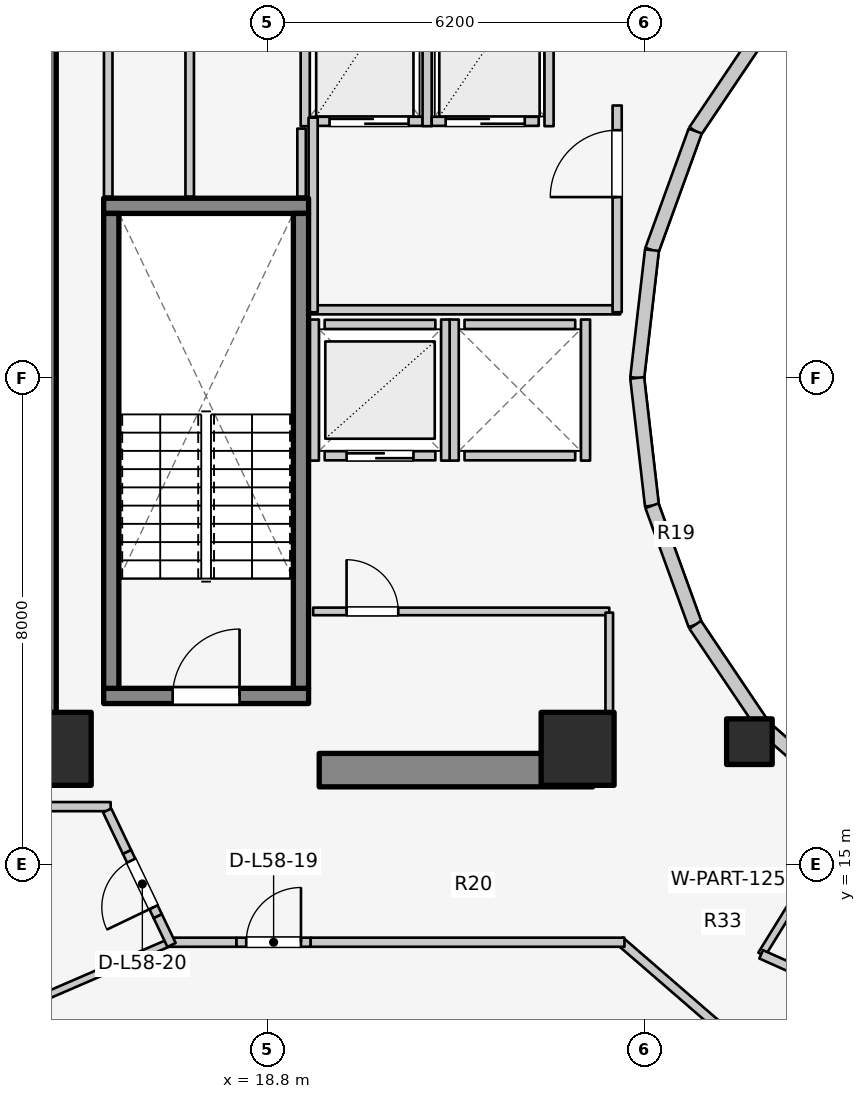
"""IFC4 building model, lengths in metres.
Left out: names, types, materials, properties, quantities, classifications, styles, units other than length and angle.
Written with IfcOpenShell. Run it as: python <this file> out.ifc"""

import sys

from ifc_helpers import new_model, si_unit, direction, frame, frame_2d, origin, origin_2d, place, context, subcontext, project, spatial, rectangle, extrude, element, fill, save


model = new_model("IFC4")
c1 = context("Model", 3, precision=1e-05, world=origin(), true_north=direction((0.0, 1.0)))
c2 = subcontext(c1, "Body", "Model", "MODEL_VIEW")
j1 = project(units=[si_unit("LENGTHUNIT", "METRE"), si_unit("PLANEANGLEUNIT", "RADIAN")], contexts=[c1])
p1 = place(None, origin())
s1 = spatial("IfcSite", under=j1, at=p1, CompositionType="ELEMENT")
p2 = place(p1, origin())
s2 = spatial("IfcBuilding", under=s1, at=p2, CompositionType="ELEMENT")
p3 = place(p2, frame((0.0, 0.0, 190.1)))
s3 = spatial("IfcBuildingStorey", under=s2, at=p3, CompositionType="ELEMENT", Elevation=190.1)
p4 = place(p3, frame((15.05, 17.05, 0.0), z_axis=(0.0, 0.0, 1.0), x_axis=(0.0, 1.0, 0.0)))
e1 = element("IfcWall", 1, at=p4, inside=s3, PredefinedType="SHEAR", context=c2, shape_type="SweptSolid", body=[
    extrude(rectangle(XDim=12.8, YDim=0.55, at=frame_2d((6.4, 0.0))), origin(), (0.0, 0.0, 1.0), 3.1),
])
p5 = place(p3, frame((19.65, 16.55, 0.0), z_axis=(0.0, 0.0, 1.0), x_axis=(1.0, 0.0, 0.0)))
e2 = element("IfcWall", 2, at=p5, inside=s3, PredefinedType="SHEAR", context=c2, shape_type="SweptSolid", body=[
    extrude(rectangle(XDim=4.5, YDim=0.55, at=frame_2d((2.25, 0.0))), origin(), (0.0, 0.0, 1.0), 3.1),
])
p6 = place(p3, frame((16.105, 17.77, 0.0), z_axis=(0.0, 0.0, 1.0), x_axis=(1.0, 0.0, 0.0)))
e3 = element("IfcWall", 3, at=p6, inside=s3, PredefinedType="SOLIDWALL", context=c2, shape_type="SweptSolid", body=[
    extrude(rectangle(XDim=3.37, YDim=0.25, at=frame_2d((1.685, 0.0))), origin(), (0.0, 0.0, 1.0), 3.1),
])
p7 = place(p6, frame((1.135, 0.0, 0.0)))
e4 = element("IfcOpeningElement", 4, at=p7, cuts=e3, PredefinedType="OPENING", context=c2, shape_type="SweptSolid", body=[
    extrude(rectangle(XDim=1.1, YDim=2.1, at=frame_2d((0.55, 1.05))), frame((0.0, 0.135, 0.0), z_axis=(0.0, -1.0, 0.0), x_axis=(1.0, 0.0, 0.0)), (0.0, 0.0, 1.0), 0.27),
])
p8 = place(p3, frame((16.105, 25.83, 0.0), z_axis=(0.0, 0.0, 1.0), x_axis=(1.0, 0.0, 0.0)))
e5 = element("IfcWall", 5, at=p8, inside=s3, PredefinedType="SOLIDWALL", context=c2, shape_type="SweptSolid", body=[
    extrude(rectangle(XDim=3.37, YDim=0.25, at=frame_2d((1.685, 0.0))), origin(), (0.0, 0.0, 1.0), 3.1),
])
for number, where, z_axis, x_axis in (
    (6, (16.23, 17.895, 0.0), (0.0, 0.0, 1.0), (0.0, 1.0, 0.0)),
    (7, (19.35, 17.895, 0.0), (0.0, 0.0, 1.0), (0.0, 1.0, 0.0)),
):
    element("IfcWall", number, at=place(p3, frame(where, z_axis=z_axis, x_axis=x_axis)), inside=s3, PredefinedType="SOLIDWALL", context=c2, shape_type="SweptSolid", body=[
        extrude(rectangle(XDim=7.81, YDim=0.25, at=frame_2d((3.905, 0.0))), origin(), (0.0, 0.0, 1.0), 3.1),
    ])
for number, where, z_axis, x_axis in (
    (8, (15.3, 16.9, 0.0), (0.0, 0.0, 1.0), (1.0, 0.0, 0.0)),
    (9, (23.9, 16.9, 0.0), (0.0, 0.0, 1.0), (1.0, 0.0, 0.0)),
):
    element("IfcColumn", number, at=place(p3, frame(where, z_axis=z_axis, x_axis=x_axis)), inside=s3, PredefinedType="COLUMN", context=c2, shape_type="SweptSolid", body=[
        extrude(rectangle(XDim=1.2, YDim=1.2, at=origin_2d()), origin(), (0.0, 0.0, 1.0), 3.1),
    ])
p9 = place(p3, frame((26.725, 17.018, 0.0), z_axis=(0.0, 0.0, 1.0), x_axis=(1.0, 0.0, 0.0)))
e10 = element("IfcColumn", 10, at=p9, inside=s3, PredefinedType="COLUMN", context=c2, shape_type="SweptSolid", body=[
    extrude(rectangle(XDim=0.75, YDim=0.75, at=origin_2d()), origin(), (0.0, 0.0, 1.0), 3.1),
])
p10 = place(p3, frame((26.965, 28.742, 0.0), z_axis=(0.0, 0.0, 1.0), x_axis=(-0.558197800898, -0.829707909492, 0.0)))
e11 = element("IfcWall", 11, at=p10, inside=s3, PredefinedType="STANDARD", context=c2, shape_type="SweptSolid", body=[
    extrude(rectangle(XDim=2.027, YDim=0.23, at=frame_2d((1.013, 0.0))), origin(), (0.0, 0.0, 1.0), 1.22),
])
p11 = place(p3, frame((25.834, 27.06, 0.0), z_axis=(0.0, 0.0, 1.0), x_axis=(-0.341423187295, -0.93990968033, 0.0)))
e12 = element("IfcWall", 12, at=p11, inside=s3, PredefinedType="STANDARD", context=c2, shape_type="SweptSolid", body=[
    extrude(rectangle(XDim=2.084, YDim=0.23, at=frame_2d((1.042, 0.0))), origin(), (0.0, 0.0, 1.0), 2.56),
])
for number, where, z_axis, x_axis in (
    (13, (25.123, 25.102, 0.0), (0.0, 0.0, 1.0), (-0.115, -0.993, 0.0)),
    (14, (24.88, 23.0, 0.0), (0.0, 0.0, 1.0), (0.115, -0.993, 0.0)),
):
    element("IfcWall", number, at=place(p3, frame(where, z_axis=z_axis, x_axis=x_axis)), inside=s3, PredefinedType="STANDARD", context=c2, shape_type="SweptSolid", body=[
        extrude(rectangle(XDim=2.115, YDim=0.23, at=frame_2d((1.058, 0.0))), origin(), (0.0, 0.0, 1.0), 2.56),
    ])
p12 = place(p3, frame((25.123, 20.898, 0.0), z_axis=(0.0, 0.0, 1.0), x_axis=(0.341423187295, -0.93990968033, 0.0)))
e15 = element("IfcWall", 15, at=p12, inside=s3, PredefinedType="STANDARD", context=c2, shape_type="SweptSolid", body=[
    extrude(rectangle(XDim=2.084, YDim=0.23, at=frame_2d((1.042, 0.0))), origin(), (0.0, 0.0, 1.0), 2.56),
])
p13 = place(p3, frame((25.834, 18.94, 0.0), z_axis=(0.0, 0.0, 1.0), x_axis=(0.558197800898, -0.829707909492, 0.0)))
e16 = element("IfcWall", 16, at=p13, inside=s3, PredefinedType="STANDARD", context=c2, shape_type="SweptSolid", body=[
    extrude(rectangle(XDim=2.027, YDim=0.23, at=frame_2d((1.013, 0.0))), origin(), (0.0, 0.0, 1.0), 1.22),
])
p14 = place(p3, frame((26.965, 17.258, 0.0), z_axis=(0.0, 0.0, 1.0), x_axis=(0.752576694707, -0.658504607869, 0.0)))
e17 = element("IfcWall", 17, at=p14, inside=s3, PredefinedType="STANDARD", context=c2, shape_type="SweptSolid", body=[
    extrude(rectangle(XDim=1.959, YDim=0.23, at=frame_2d((0.98, 0.0))), origin(), (0.0, 0.0, 1.0), 1.22),
])
p15 = place(p3, frame((12.381, 13.757, 0.0), z_axis=(0.0, 0.0, 1.0), x_axis=(0.790185650662, -0.612867552973, 0.0)))
e18 = element("IfcWall", 18, at=p15, inside=s3, PredefinedType="STANDARD", context=c2, shape_type="SweptSolid", body=[
    extrude(rectangle(XDim=4.239, YDim=0.26, at=frame_2d((2.12, 0.0))), origin(), (0.0, 0.0, 1.0), 1.22),
])
p16 = place(p15, frame((0.536, 0.0, 0.15)))
e19 = element("IfcOpeningElement", 19, at=p16, cuts=e18, PredefinedType="OPENING", context=c2, shape_type="SweptSolid", body=[
    extrude(rectangle(XDim=1.2, YDim=0.9, at=frame_2d((0.6, 0.45))), frame((0.0, 0.14, 0.0), z_axis=(0.0, -1.0, 0.0), x_axis=(1.0, 0.0, 0.0)), (0.0, 0.0, 1.0), 0.28),
])
p17 = place(p3, frame((19.74, 21.72, 0.0), z_axis=(0.0, 0.0, 1.0), x_axis=(1.0, 0.0, 0.0)))
e20 = element("IfcWall", 20, at=p17, inside=s3, PredefinedType="SOLIDWALL", context=c2, shape_type="SweptSolid", body=[
    extrude(rectangle(XDim=1.82, YDim=0.15, at=frame_2d((0.91, 0.0))), origin(), (0.0, 0.0, 1.0), 2.575),
])
p18 = place(p17, frame((0.36, 0.0, 0.0)))
e21 = element("IfcOpeningElement", 21, at=p18, cuts=e20, PredefinedType="OPENING", context=c2, shape_type="SweptSolid", body=[
    extrude(rectangle(XDim=1.1, YDim=2.1, at=frame_2d((0.55, 1.05))), frame((0.0, 0.085, 0.0), z_axis=(0.0, -1.0, 0.0), x_axis=(1.0, 0.0, 0.0)), (0.0, 0.0, 1.0), 0.17),
])
p19 = place(p3, frame((19.74, 23.88, 0.0), z_axis=(0.0, 0.0, 1.0), x_axis=(1.0, 0.0, 0.0)))
e22 = element("IfcWall", 22, at=p19, inside=s3, PredefinedType="SOLIDWALL", context=c2, shape_type="SweptSolid", body=[
    extrude(rectangle(XDim=1.82, YDim=0.15, at=frame_2d((0.91, 0.0))), origin(), (0.0, 0.0, 1.0), 2.575),
])
for number, where, z_axis, x_axis in (
    (23, (19.57, 21.64, 0.0), (0.0, 0.0, 1.0), (0.0, 1.0, 0.0)),
    (24, (21.73, 21.64, 0.0), (0.0, 0.0, 1.0), (0.0, 1.0, 0.0)),
):
    element("IfcWall", number, at=place(p3, frame(where, z_axis=z_axis, x_axis=x_axis)), inside=s3, PredefinedType="SOLIDWALL", context=c2, shape_type="SweptSolid", body=[
        extrude(rectangle(XDim=2.32, YDim=0.15, at=frame_2d((1.16, 0.0))), origin(), (0.0, 0.0, 1.0), 2.575),
    ])
for number, where, z_axis, x_axis in (
    (25, (22.04, 21.72, 0.0), (0.0, 0.0, 1.0), (1.0, 0.0, 0.0)),
    (26, (22.04, 23.88, 0.0), (0.0, 0.0, 1.0), (1.0, 0.0, 0.0)),
):
    element("IfcWall", number, at=place(p3, frame(where, z_axis=z_axis, x_axis=x_axis)), inside=s3, PredefinedType="SOLIDWALL", context=c2, shape_type="SweptSolid", body=[
        extrude(rectangle(XDim=1.82, YDim=0.15, at=frame_2d((0.91, 0.0))), origin(), (0.0, 0.0, 1.0), 2.12),
    ])
p20 = place(p3, frame((21.87, 21.64, 0.0), z_axis=(0.0, 0.0, 1.0), x_axis=(0.0, 1.0, 0.0)))
e27 = element("IfcWall", 27, at=p20, inside=s3, PredefinedType="SOLIDWALL", context=c2, shape_type="SweptSolid", body=[
    extrude(rectangle(XDim=2.32, YDim=0.15, at=frame_2d((1.16, 0.0))), origin(), (0.0, 0.0, 1.0), 2.575),
])
p21 = place(p3, frame((24.03, 21.64, 0.0), z_axis=(0.0, 0.0, 1.0), x_axis=(0.0, 1.0, 0.0)))
e28 = element("IfcWall", 28, at=p21, inside=s3, PredefinedType="SOLIDWALL", context=c2, shape_type="SweptSolid", body=[
    extrude(rectangle(XDim=2.32, YDim=0.15, at=frame_2d((1.16, 0.0))), origin(), (0.0, 0.0, 1.0), 2.12),
])
p22 = place(p3, frame((19.59, 27.22, 0.0), z_axis=(0.0, 0.0, 1.0), x_axis=(1.0, 0.0, 0.0)))
e29 = element("IfcWall", 29, at=p22, inside=s3, PredefinedType="SOLIDWALL", context=c2, shape_type="SweptSolid", body=[
    extrude(rectangle(XDim=1.76, YDim=0.15, at=frame_2d((0.88, 0.0))), origin(), (0.0, 0.0, 1.0), 2.575),
])
p23 = place(p22, frame((0.23, 0.0, 0.0)))
e30 = element("IfcOpeningElement", 30, at=p23, cuts=e29, PredefinedType="OPENING", context=c2, shape_type="SweptSolid", body=[
    extrude(rectangle(XDim=1.3, YDim=2.1, at=frame_2d((0.65, 1.05))), frame((0.0, 0.085, 0.0), z_axis=(0.0, -1.0, 0.0), x_axis=(1.0, 0.0, 0.0)), (0.0, 0.0, 1.0), 0.17),
])
for number, where, z_axis, x_axis in (
    (31, (19.42, 27.14, 0.0), (0.0, 0.0, 1.0), (0.0, 1.0, 0.0)),
    (32, (21.425, 27.14, 0.0), (0.0, 0.0, 1.0), (0.0, 1.0, 0.0)),
):
    element("IfcWall", number, at=place(p3, frame(where, z_axis=z_axis, x_axis=x_axis)), inside=s3, PredefinedType="SOLIDWALL", context=c2, shape_type="SweptSolid", body=[
        extrude(rectangle(XDim=2.72, YDim=0.15, at=frame_2d((1.36, 0.0))), origin(), (0.0, 0.0, 1.0), 2.575),
    ])
p24 = place(p3, frame((21.5, 27.22, 0.0), z_axis=(0.0, 0.0, 1.0), x_axis=(1.0, 0.0, 0.0)))
e33 = element("IfcWall", 33, at=p24, inside=s3, PredefinedType="SOLIDWALL", context=c2, shape_type="SweptSolid", body=[
    extrude(rectangle(XDim=1.76, YDim=0.15, at=frame_2d((0.88, 0.0))), origin(), (0.0, 0.0, 1.0), 2.575),
])
p25 = place(p24, frame((0.23, 0.0, 0.0)))
e34 = element("IfcOpeningElement", 34, at=p25, cuts=e33, PredefinedType="OPENING", context=c2, shape_type="SweptSolid", body=[
    extrude(rectangle(XDim=1.3, YDim=2.1, at=frame_2d((0.65, 1.05))), frame((0.0, 0.085, 0.0), z_axis=(0.0, -1.0, 0.0), x_axis=(1.0, 0.0, 0.0)), (0.0, 0.0, 1.0), 0.17),
])
p26 = place(p3, frame((23.43, 27.14, 0.0), z_axis=(0.0, 0.0, 1.0), x_axis=(0.0, 1.0, 0.0)))
e35 = element("IfcWall", 35, at=p26, inside=s3, PredefinedType="SOLIDWALL", context=c2, shape_type="SweptSolid", body=[
    extrude(rectangle(XDim=2.72, YDim=0.15, at=frame_2d((1.36, 0.0))), origin(), (0.0, 0.0, 1.0), 2.575),
])
p27 = place(p3, frame((19.52, 24.12, 0.0), z_axis=(0.0, 0.0, 1.0), x_axis=(1.0, 0.0, 0.0)))
e36 = element("IfcWall", 36, at=p27, inside=s3, PredefinedType="PARTITIONING", context=c2, shape_type="SweptSolid", body=[
    extrude(rectangle(XDim=5.08, YDim=0.15, at=frame_2d((2.54, 0.0))), origin(), (0.0, 0.0, 1.0), 2.12),
])
p28 = place(p3, frame((19.55, 24.08, 0.0), z_axis=(0.0, 0.0, 1.0), x_axis=(0.0, 1.0, 0.0)))
e37 = element("IfcWall", 37, at=p28, inside=s3, PredefinedType="PARTITIONING", context=c2, shape_type="SweptSolid", body=[
    extrude(rectangle(XDim=3.2, YDim=0.15, at=frame_2d((1.6, 0.0))), origin(), (0.0, 0.0, 1.0), 2.575),
])
p29 = place(p3, frame((24.55, 24.08, 0.0), z_axis=(0.0, 0.0, 1.0), x_axis=(0.0, 1.0, 0.0)))
e38 = element("IfcWall", 38, at=p29, inside=s3, PredefinedType="PARTITIONING", context=c2, shape_type="SweptSolid", body=[
    extrude(rectangle(XDim=3.4, YDim=0.15, at=frame_2d((1.7, 0.0))), origin(), (0.0, 0.0, 1.0), 2.575),
])
p30 = place(p29, frame((1.894, 0.0, 0.0)))
e39 = element("IfcOpeningElement", 39, at=p30, cuts=e38, PredefinedType="OPENING", context=c2, shape_type="SweptSolid", body=[
    extrude(rectangle(XDim=1.1, YDim=2.1, at=frame_2d((0.55, 1.05))), frame((0.0, 0.085, 0.0), z_axis=(0.0, -1.0, 0.0), x_axis=(1.0, 0.0, 0.0)), (0.0, 0.0, 1.0), 0.17),
])
p31 = place(p3, frame((19.55, 19.16, 0.0), z_axis=(0.0, 0.0, 1.0), x_axis=(1.0, 0.0, 0.0)))
e40 = element("IfcWall", 40, at=p31, inside=s3, PredefinedType="PARTITIONING", context=c2, shape_type="SweptSolid", body=[
    extrude(rectangle(XDim=4.87, YDim=0.125, at=frame_2d((2.435, 0.0))), origin(), (0.0, 0.0, 1.0), 2.12),
])
p32 = place(p31, frame((0.55, 0.0, 0.0)))
e41 = element("IfcOpeningElement", 41, at=p32, cuts=e40, PredefinedType="OPENING", context=c2, shape_type="SweptSolid", body=[
    extrude(rectangle(XDim=0.85, YDim=2.05, at=frame_2d((0.425, 1.025))), frame((0.0, 0.073, 0.0), z_axis=(0.0, -1.0, 0.0), x_axis=(1.0, 0.0, 0.0)), (0.0, 0.0, 1.0), 0.145),
])
p33 = place(p3, frame((24.42, 17.1, 0.0), z_axis=(0.0, 0.0, 1.0), x_axis=(0.0, 1.0, 0.0)))
e42 = element("IfcWall", 42, at=p33, inside=s3, PredefinedType="PARTITIONING", context=c2, shape_type="SweptSolid", body=[
    extrude(rectangle(XDim=2.04, YDim=0.125, at=frame_2d((1.02, 0.0))), origin(), (0.0, 0.0, 1.0), 1.952),
])
for number, where, z_axis, x_axis in (
    (43, (16.18, 25.98, 0.0), (0.0, 0.0, 1.0), (0.0, 1.0, 0.0)),
    (44, (17.52, 25.98, 0.0), (0.0, 0.0, 1.0), (0.0, 1.0, 0.0)),
):
    element("IfcWall", number, at=place(p3, frame(where, z_axis=z_axis, x_axis=x_axis)), inside=s3, PredefinedType="PLUMBINGWALL", context=c2, shape_type="SweptSolid", body=[
        extrude(rectangle(XDim=3.88, YDim=0.14, at=frame_2d((1.94, 0.0))), origin(), (0.0, 0.0, 1.0), 2.575),
    ])
p34 = place(p3, frame((19.36, 25.98, 0.0), z_axis=(0.0, 0.0, 1.0), x_axis=(0.0, 1.0, 0.0)))
e45 = element("IfcWall", 45, at=p34, inside=s3, PredefinedType="PLUMBINGWALL", context=c2, shape_type="SweptSolid", body=[
    extrude(rectangle(XDim=1.12, YDim=0.14, at=frame_2d((0.56, 0.0))), origin(), (0.0, 0.0, 1.0), 2.575),
])
p35 = place(p3, frame((10.96, 15.95, 0.0), z_axis=(0.0, 0.0, 1.0), x_axis=(1.0, 0.0, 0.0)))
e46 = element("IfcWall", 46, at=p35, inside=s3, PredefinedType="PARTITIONING", context=c2, shape_type="SweptSolid", body=[
    extrude(rectangle(XDim=5.26, YDim=0.15, at=frame_2d((2.63, 0.0))), origin(), (0.0, 0.0, 1.0), 1.22),
])
p36 = place(p3, frame((17.246, 13.74, 0.0), z_axis=(0.0, 0.0, 1.0), x_axis=(-0.917766865873, -0.397119604031, 0.0)))
e47 = element("IfcWall", 47, at=p36, inside=s3, PredefinedType="MOVABLE", context=c2, shape_type="SweptSolid", body=[
    extrude(rectangle(XDim=3.413, YDim=0.12, at=frame_2d((1.707, 0.0))), origin(), (0.0, 0.0, 1.0), 1.22),
])
p37 = place(p3, frame((26.193, 12.358, 0.0), z_axis=(0.0, 0.0, 1.0), x_axis=(-0.756055312247, 0.654507727092, 0.0)))
e48 = element("IfcWall", 48, at=p37, inside=s3, PredefinedType="PARTITIONING", context=c2, shape_type="SweptSolid", body=[
    extrude(rectangle(XDim=2.111, YDim=0.15, at=frame_2d((1.055, 0.0))), origin(), (0.0, 0.0, 1.0), 1.22),
])
p38 = place(p3, frame((17.15, 13.72, 0.0), z_axis=(0.0, 0.0, 1.0), x_axis=(1.0, 0.0, 0.0)))
e49 = element("IfcWall", 49, at=p38, inside=s3, PredefinedType="PARTITIONING", context=c2, shape_type="SweptSolid", body=[
    extrude(rectangle(XDim=1.14, YDim=0.15, at=frame_2d((0.57, 0.0))), origin(), (0.0, 0.0, 1.0), 2.575),
])
p39 = place(p3, frame((18.29, 13.72, 0.0), z_axis=(0.0, 0.0, 1.0), x_axis=(1.0, 0.0, 0.0)))
e50 = element("IfcWall", 50, at=p39, inside=s3, PredefinedType="PARTITIONING", context=c2, shape_type="SweptSolid", body=[
    extrude(rectangle(XDim=1.22, YDim=0.15, at=frame_2d((0.61, 0.0))), origin(), (0.0, 0.0, 1.0), 2.16),
])
p40 = place(p39, frame((0.16, 0.0, 0.0)))
e51 = element("IfcOpeningElement", 51, at=p40, cuts=e50, PredefinedType="OPENING", context=c2, shape_type="SweptSolid", body=[
    extrude(rectangle(XDim=0.9, YDim=2.1, at=frame_2d((0.45, 1.05))), frame((0.0, 0.085, 0.0), z_axis=(0.0, -1.0, 0.0), x_axis=(1.0, 0.0, 0.0)), (0.0, 0.0, 1.0), 0.17),
])
p41 = place(p3, frame((19.51, 13.72, 0.0), z_axis=(0.0, 0.0, 1.0), x_axis=(1.0, 0.0, 0.0)))
e52 = element("IfcWall", 52, at=p41, inside=s3, PredefinedType="PARTITIONING", context=c2, shape_type="SweptSolid", body=[
    extrude(rectangle(XDim=5.16, YDim=0.15, at=frame_2d((2.58, 0.0))), origin(), (0.0, 0.0, 1.0), 1.22),
])
p42 = place(p3, frame((17.222, 13.675, 0.0), z_axis=(0.0, 0.0, 1.0), x_axis=(-0.431782981727, 0.901977525602, 0.0)))
e53 = element("IfcWall", 53, at=p42, inside=s3, PredefinedType="PARTITIONING", context=c2, shape_type="SweptSolid", body=[
    extrude(rectangle(XDim=0.528, YDim=0.15, at=frame_2d((0.264, 0.0))), origin(), (0.0, 0.0, 1.0), 2.575),
])
p43 = place(p3, frame((16.994, 14.151, 0.0), z_axis=(0.0, 0.0, 1.0), x_axis=(-0.431957534962, 0.901893944979, 0.0)))
e54 = element("IfcWall", 54, at=p43, inside=s3, PredefinedType="PARTITIONING", context=c2, shape_type="SweptSolid", body=[
    extrude(rectangle(XDim=1.17, YDim=0.15, at=frame_2d((0.585, 0.0))), origin(), (0.0, 0.0, 1.0), 2.575),
])
p44 = place(p43, frame((0.16, 0.0, 0.0)))
e55 = element("IfcOpeningElement", 55, at=p44, cuts=e54, PredefinedType="OPENING", context=c2, shape_type="SweptSolid", body=[
    extrude(rectangle(XDim=0.85, YDim=2.05, at=frame_2d((0.425, 1.025))), frame((0.0, 0.085, 0.0), z_axis=(0.0, -1.0, 0.0), x_axis=(1.0, 0.0, 0.0)), (0.0, 0.0, 1.0), 0.17),
])
p45 = place(p3, frame((16.489, 15.206, 0.0), z_axis=(0.0, 0.0, 1.0), x_axis=(-0.432131149195, 0.901810772776, 0.0)))
e56 = element("IfcWall", 56, at=p45, inside=s3, PredefinedType="PARTITIONING", context=c2, shape_type="SweptSolid", body=[
    extrude(rectangle(XDim=0.754, YDim=0.15, at=frame_2d((0.377, 0.0))), origin(), (0.0, 0.0, 1.0), 1.22),
])
p46 = place(p3, frame((28.45, 15.985, 0.0), z_axis=(0.0, 0.0, 1.0), x_axis=(-0.525627246902, -0.850714991824, 0.0)))
e57 = element("IfcWall", 57, at=p46, inside=s3, PredefinedType="PARTITIONING", context=c2, shape_type="SweptSolid", body=[
    extrude(rectangle(XDim=2.901, YDim=0.125, at=frame_2d((1.451, 0.0))), origin(), (0.0, 0.0, 1.0), 1.22),
])
p47 = place(p3, frame((26.919, 13.521, 0.0), z_axis=(0.0, 0.0, 1.0), x_axis=(0.912888568324, -0.408208845842, 0.0)))
e58 = element("IfcWall", 58, at=p47, inside=s3, PredefinedType="PARTITIONING", context=c2, shape_type="SweptSolid", body=[
    extrude(rectangle(XDim=2.69, YDim=0.15, at=frame_2d((1.345, 0.0))), origin(), (0.0, 0.0, 1.0), 1.22),
])
p48 = place(p7, origin())
e59 = element("IfcDoor", 59, at=p48, inside=s3, OperationType="SINGLE_SWING_RIGHT", PredefinedType="DOOR", context=c2, shape_type="SweptSolid", body=[
    extrude(rectangle(XDim=1.1, YDim=2.1, at=frame_2d((0.55, 1.05))), frame((0.0, 0.025, 0.0), z_axis=(0.0, -1.0, 0.0), x_axis=(1.0, 0.0, 0.0)), (0.0, 0.0, 1.0), 0.05),
])
fill(e4, e59)
p49 = place(p18, origin())
e60 = element("IfcDoor", 60, at=p49, inside=s3, OperationType="DOUBLE_DOOR_SLIDING", PredefinedType="DOOR", context=c2, shape_type="SweptSolid", body=[
    extrude(rectangle(XDim=1.1, YDim=2.1, at=frame_2d((0.55, 1.05))), frame((0.0, 0.025, 0.0), z_axis=(0.0, -1.0, 0.0), x_axis=(1.0, 0.0, 0.0)), (0.0, 0.0, 1.0), 0.05),
])
fill(e21, e60)
p50 = place(p23, origin())
e61 = element("IfcDoor", 61, at=p50, inside=s3, OperationType="DOUBLE_DOOR_SLIDING", PredefinedType="DOOR", context=c2, shape_type="SweptSolid", body=[
    extrude(rectangle(XDim=1.3, YDim=2.1, at=frame_2d((0.65, 1.05))), frame((0.0, 0.025, 0.0), z_axis=(0.0, -1.0, 0.0), x_axis=(1.0, 0.0, 0.0)), (0.0, 0.0, 1.0), 0.05),
])
fill(e30, e61)
p51 = place(p25, origin())
e62 = element("IfcDoor", 62, at=p51, inside=s3, OperationType="DOUBLE_DOOR_SLIDING", PredefinedType="DOOR", context=c2, shape_type="SweptSolid", body=[
    extrude(rectangle(XDim=1.3, YDim=2.1, at=frame_2d((0.65, 1.05))), frame((0.0, 0.025, 0.0), z_axis=(0.0, -1.0, 0.0), x_axis=(1.0, 0.0, 0.0)), (0.0, 0.0, 1.0), 0.05),
])
fill(e34, e62)
p52 = place(p30, origin())
e63 = element("IfcDoor", 63, at=p52, inside=s3, OperationType="SINGLE_SWING_LEFT", PredefinedType="DOOR", context=c2, shape_type="SweptSolid", body=[
    extrude(rectangle(XDim=1.1, YDim=2.1, at=frame_2d((0.55, 1.05))), frame((0.0, 0.025, 0.0), z_axis=(0.0, -1.0, 0.0), x_axis=(1.0, 0.0, 0.0)), (0.0, 0.0, 1.0), 0.05),
])
fill(e39, e63)
p53 = place(p32, origin())
e64 = element("IfcDoor", 64, at=p53, inside=s3, OperationType="SINGLE_SWING_LEFT", PredefinedType="DOOR", context=c2, shape_type="SweptSolid", body=[
    extrude(rectangle(XDim=0.85, YDim=2.05, at=frame_2d((0.425, 1.025))), frame((0.0, 0.025, 0.0), z_axis=(0.0, -1.0, 0.0), x_axis=(1.0, 0.0, 0.0)), (0.0, 0.0, 1.0), 0.05),
])
fill(e41, e64)
p54 = place(p40, origin())
e65 = element("IfcDoor", 65, at=p54, inside=s3, OperationType="SINGLE_SWING_RIGHT", PredefinedType="DOOR", context=c2, shape_type="SweptSolid", body=[
    extrude(rectangle(XDim=0.9, YDim=2.1, at=frame_2d((0.45, 1.05))), frame((0.0, 0.025, 0.0), z_axis=(0.0, -1.0, 0.0), x_axis=(1.0, 0.0, 0.0)), (0.0, 0.0, 1.0), 0.05),
])
fill(e51, e65)
p55 = place(p44, origin())
e66 = element("IfcDoor", 66, at=p55, inside=s3, OperationType="SINGLE_SWING_LEFT", PredefinedType="DOOR", context=c2, shape_type="SweptSolid", body=[
    extrude(rectangle(XDim=0.85, YDim=2.05, at=frame_2d((0.425, 1.025))), frame((0.0, 0.025, 0.0), z_axis=(0.0, -1.0, 0.0), x_axis=(1.0, 0.0, 0.0)), (0.0, 0.0, 1.0), 0.05),
])
fill(e55, e66)
save(model, sys.argv[1])
